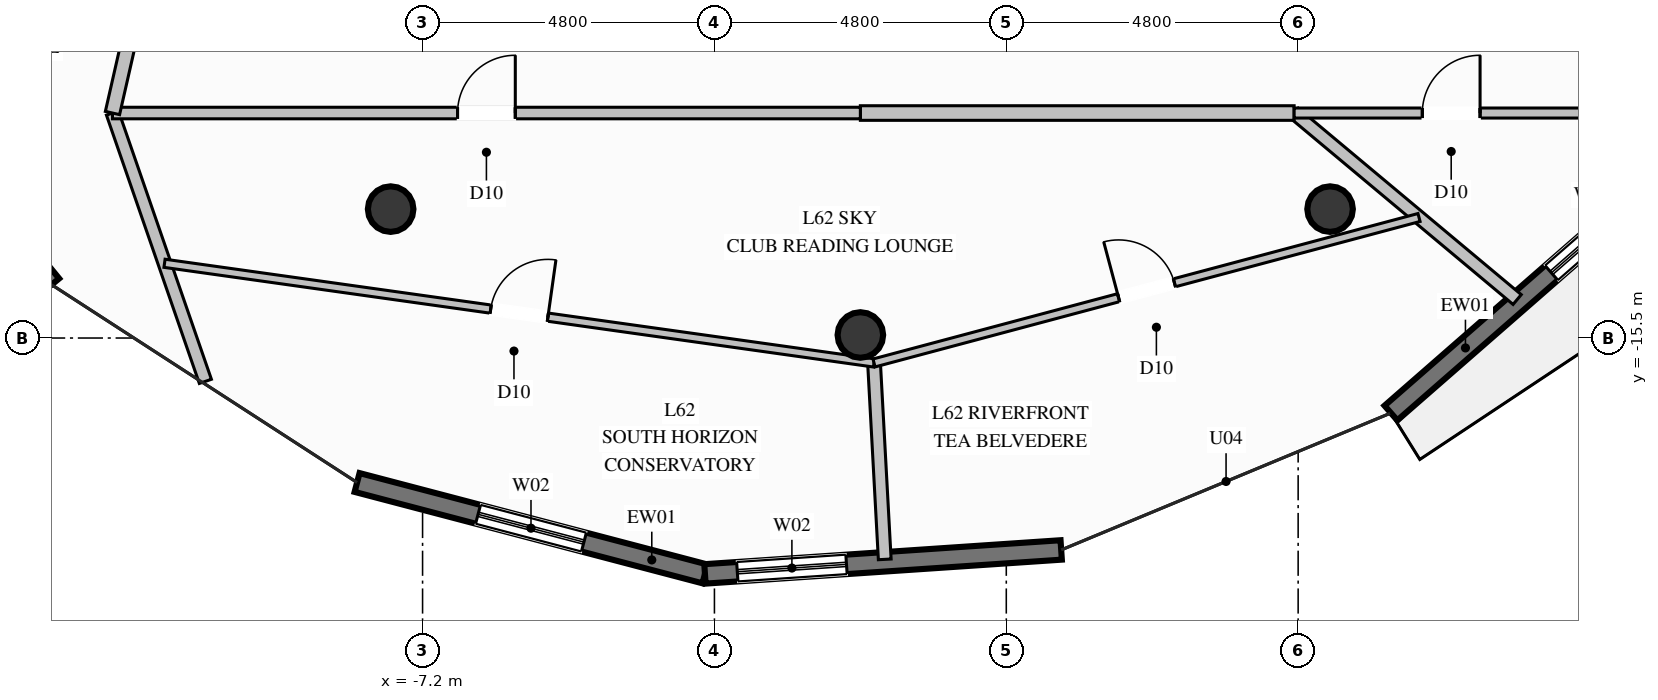
"""IFC4 building model, lengths in metres.
Left out: names, types, materials, properties, quantities, classifications, styles, units other than length and angle.
Written with IfcOpenShell. Run it as: python <this file> out.ifc"""

import sys

from ifc_helpers import new_model, si_unit, direction, frame, frame_2d, origin, origin_2d, place, context, subcontext, project, spatial, rectangle, circle, extrude, element, fill, save


model = new_model("IFC4")
c1 = context("Model", 3, precision=1e-05, world=origin(), true_north=direction((0.0, 1.0)))
c2 = subcontext(c1, "Body", "Model", "MODEL_VIEW")
j1 = project(units=[si_unit("LENGTHUNIT", "METRE"), si_unit("PLANEANGLEUNIT", "RADIAN")], contexts=[c1])
p1 = place(None, origin())
s1 = spatial("IfcSite", under=j1, at=p1, CompositionType="ELEMENT")
p2 = place(p1, origin())
s2 = spatial("IfcBuilding", under=s1, at=p2, CompositionType="ELEMENT")
p3 = place(p2, frame((0.0, 0.0, 239.2)))
s3 = spatial("IfcBuildingStorey", under=s2, at=p3, CompositionType="ELEMENT", Elevation=239.2)
for number, where, z_axis, x_axis in (
    (1, (-7.725, -13.38, 0.0), (0.0, 0.0, 1.0), (1.0, 0.0, 0.0)),
    (2, (0.0, -15.45, 0.0), (0.0, 0.0, 1.0), (1.0, 0.0, 0.0)),
    (3, (7.725, -13.38, 0.0), (0.0, 0.0, 1.0), (1.0, 0.0, 0.0)),
):
    element("IfcColumn", number, at=place(p3, frame(where, z_axis=z_axis, x_axis=x_axis)), inside=s3, PredefinedType="COLUMN", context=c2, shape_type="SweptSolid", body=[
        extrude(circle(Radius=0.375, at=origin_2d()), origin(), (0.0, 0.0, 1.0), 3.8),
    ])
p4 = place(p3, frame((13.182, -12.842, 0.0), z_axis=(0.0, 0.0, 1.0), x_axis=(-0.753243589512, -0.657741662706, 0.0)))
e4 = element("IfcWall", 4, at=p4, inside=s3, PredefinedType="SOLIDWALL", context=c2, shape_type="SweptSolid", body=[
    extrude(rectangle(XDim=5.916, YDim=0.32, at=frame_2d((2.958, 0.0))), origin(), (0.0, 0.0, 1.0), 3.57),
])
p5 = place(p4, frame((0.612, 0.0, 0.35)))
e5 = element("IfcOpeningElement", 5, at=p5, cuts=e4, PredefinedType="OPENING", context=c2, shape_type="SweptSolid", body=[
    extrude(rectangle(XDim=1.8, YDim=2.6, at=frame_2d((0.9, 1.3))), frame((0.0, 0.17, 0.0), z_axis=(0.0, -1.0, 0.0), x_axis=(1.0, 0.0, 0.0)), (0.0, 0.0, 1.0), 0.34),
])
p6 = place(p3, frame((-13.301, -14.623, 0.0), z_axis=(0.0, 0.0, 1.0), x_axis=(-0.633391522875, 0.773831492478, 0.0)))
e6 = element("IfcWall", 6, at=p6, inside=s3, PredefinedType="SOLIDWALL", context=c2, shape_type="SweptSolid", body=[
    extrude(rectangle(XDim=6.053, YDim=0.32, at=frame_2d((3.027, 0.0))), origin(), (0.0, 0.0, 1.0), 3.57),
])
p7 = place(p6, frame((2.092, 0.0, 0.35)))
e7 = element("IfcOpeningElement", 7, at=p7, cuts=e6, PredefinedType="OPENING", context=c2, shape_type="SweptSolid", body=[
    extrude(rectangle(XDim=1.8, YDim=2.6, at=frame_2d((0.9, 1.3))), frame((0.0, 0.17, 0.0), z_axis=(0.0, -1.0, 0.0), x_axis=(1.0, 0.0, 0.0)), (0.0, 0.0, 1.0), 0.34),
])
p8 = place(p3, frame((-2.556, -19.379, 0.0), z_axis=(0.0, 0.0, 1.0), x_axis=(-0.96718457854, 0.254074774494, 0.0)))
e8 = element("IfcWall", 8, at=p8, inside=s3, PredefinedType="SOLIDWALL", context=c2, shape_type="SweptSolid", body=[
    extrude(rectangle(XDim=5.915, YDim=0.32, at=frame_2d((2.958, 0.0))), origin(), (0.0, 0.0, 1.0), 3.57),
])
p9 = place(p8, frame((2.058, 0.0, 0.35)))
e9 = element("IfcOpeningElement", 9, at=p9, cuts=e8, PredefinedType="OPENING", context=c2, shape_type="SweptSolid", body=[
    extrude(rectangle(XDim=1.8, YDim=2.6, at=frame_2d((0.9, 1.3))), frame((0.0, 0.17, 0.0), z_axis=(0.0, -1.0, 0.0), x_axis=(1.0, 0.0, 0.0)), (0.0, 0.0, 1.0), 0.34),
])
p10 = place(p3, frame((3.303, -18.985, 0.0), z_axis=(0.0, 0.0, 1.0), x_axis=(-0.997748768453, -0.067062620365, 0.0)))
e10 = element("IfcWall", 10, at=p10, inside=s3, PredefinedType="SOLIDWALL", context=c2, shape_type="SweptSolid", body=[
    extrude(rectangle(XDim=5.872, YDim=0.32, at=frame_2d((2.936, 0.0))), origin(), (0.0, 0.0, 1.0), 3.57),
])
p11 = place(p10, frame((3.539, 0.0, 0.35)))
e11 = element("IfcOpeningElement", 11, at=p11, cuts=e10, PredefinedType="OPENING", context=c2, shape_type="SweptSolid", body=[
    extrude(rectangle(XDim=1.8, YDim=2.6, at=frame_2d((0.9, 1.3))), frame((0.0, 0.17, 0.0), z_axis=(0.0, -1.0, 0.0), x_axis=(1.0, 0.0, 0.0)), (0.0, 0.0, 1.0), 0.34),
])
p12 = place(p3, frame((7.134, -11.8, 0.0), z_axis=(0.0, 0.0, 1.0), x_axis=(0.767165499913, -0.641449215249, 0.0)))
e12 = element("IfcWall", 12, at=p12, inside=s3, PredefinedType="PARTITIONING", context=c2, shape_type="SweptSolid", body=[
    extrude(rectangle(XDim=4.781, YDim=0.21, at=frame_2d((2.391, 0.0))), origin(), (0.0, 0.0, 1.0), 3.57),
])
p13 = place(p3, frame((-12.3, -11.8, 0.0), z_axis=(0.0, 0.0, 1.0), x_axis=(0.327216501768, -0.944949395984, 0.0)))
e13 = element("IfcWall", 13, at=p13, inside=s3, PredefinedType="PARTITIONING", context=c2, shape_type="SweptSolid", body=[
    extrude(rectangle(XDim=4.67, YDim=0.21, at=frame_2d((2.335, 0.0))), origin(), (0.0, 0.0, 1.0), 3.57),
])
p14 = place(p3, frame((0.0, -11.8, 0.0), z_axis=(0.0, 0.0, 1.0), x_axis=(1.0, 0.0, 0.0)))
e14 = element("IfcWall", 14, at=p14, inside=s3, PredefinedType="PARTITIONING", context=c2, shape_type="SweptSolid", body=[
    extrude(rectangle(XDim=7.134, YDim=0.24, at=frame_2d((3.567, 0.0))), origin(), (0.0, 0.0, 1.0), 3.57),
])
p15 = place(p3, frame((-12.3, -11.8, 0.0), z_axis=(0.0, 0.0, 1.0), x_axis=(1.0, 0.0, 0.0)))
e15 = element("IfcWall", 15, at=p15, inside=s3, PredefinedType="PARTITIONING", context=c2, shape_type="SweptSolid", body=[
    extrude(rectangle(XDim=12.3, YDim=0.19, at=frame_2d((6.15, 0.0))), origin(), (0.0, 0.0, 1.0), 3.57),
])
p16 = place(p15, frame((5.675, 0.0, 0.0)))
e16 = element("IfcOpeningElement", 16, at=p16, cuts=e15, PredefinedType="OPENING", context=c2, shape_type="SweptSolid", body=[
    extrude(rectangle(XDim=0.95, YDim=2.1, at=frame_2d((0.475, 1.05))), frame((0.0, 0.105, 0.0), z_axis=(0.0, -1.0, 0.0), x_axis=(1.0, 0.0, 0.0)), (0.0, 0.0, 1.0), 0.21),
])
p17 = place(p3, frame((-11.042, -6.275, 0.0), z_axis=(0.0, 0.0, 1.0), x_axis=(-0.222014008723, -0.975043475918, 0.0)))
e17 = element("IfcWall", 17, at=p17, inside=s3, PredefinedType="PARTITIONING", context=c2, shape_type="SweptSolid", body=[
    extrude(rectangle(XDim=5.667, YDim=0.24, at=frame_2d((2.833, 0.0))), origin(), (0.0, 0.0, 1.0), 3.57),
])
p18 = place(p17, frame((2.333, 0.0, 0.0)))
e18 = element("IfcOpeningElement", 18, at=p18, cuts=e17, PredefinedType="OPENING", context=c2, shape_type="SweptSolid", body=[
    extrude(rectangle(XDim=1.0, YDim=2.2, at=frame_2d((0.5, 1.1))), frame((0.0, 0.13, 0.0), z_axis=(0.0, -1.0, 0.0), x_axis=(1.0, 0.0, 0.0)), (0.0, 0.0, 1.0), 0.26),
])
p19 = place(p3, frame((0.225, -15.91, 0.0), z_axis=(0.0, 0.0, 1.0), x_axis=(0.054341356021, -0.998522416887, 0.0)))
e19 = element("IfcWall", 19, at=p19, inside=s3, PredefinedType="PARTITIONING", context=c2, shape_type="SweptSolid", body=[
    extrude(rectangle(XDim=3.235, YDim=0.21, at=frame_2d((1.617, 0.0))), origin(), (0.0, 0.0, 1.0), 3.57),
])
p20 = place(p3, frame((-11.444, -14.271, 0.0), z_axis=(0.0, 0.0, 1.0), x_axis=(0.990280714827, -0.139083089705, 0.0)))
e20 = element("IfcWall", 20, at=p20, inside=s3, PredefinedType="PARTITIONING", context=c2, shape_type="SweptSolid", body=[
    extrude(rectangle(XDim=11.784, YDim=0.135, at=frame_2d((5.892, 0.0))), origin(), (0.0, 0.0, 1.0), 3.139),
])
p21 = place(p20, frame((5.417, 0.0, 0.0)))
e21 = element("IfcOpeningElement", 21, at=p21, cuts=e20, PredefinedType="OPENING", context=c2, shape_type="SweptSolid", body=[
    extrude(rectangle(XDim=0.95, YDim=2.1, at=frame_2d((0.475, 1.05))), frame((0.0, 0.078, 0.0), z_axis=(0.0, -1.0, 0.0), x_axis=(1.0, 0.0, 0.0)), (0.0, 0.0, 1.0), 0.155),
])
p22 = place(p3, frame((0.225, -15.91, 0.0), z_axis=(0.0, 0.0, 1.0), x_axis=(0.966188184598, 0.25783791797, 0.0)))
e22 = element("IfcWall", 22, at=p22, inside=s3, PredefinedType="PARTITIONING", context=c2, shape_type="SweptSolid", body=[
    extrude(rectangle(XDim=9.277, YDim=0.135, at=frame_2d((4.638, 0.0))), origin(), (0.0, 0.0, 1.0), 3.139),
])
p23 = place(p22, frame((4.163, 0.0, 0.0)))
e23 = element("IfcOpeningElement", 23, at=p23, cuts=e22, PredefinedType="OPENING", context=c2, shape_type="SweptSolid", body=[
    extrude(rectangle(XDim=0.95, YDim=2.1, at=frame_2d((0.475, 1.05))), frame((0.0, 0.078, 0.0), z_axis=(0.0, -1.0, 0.0), x_axis=(1.0, 0.0, 0.0)), (0.0, 0.0, 1.0), 0.155),
])
p24 = place(p3, frame((12.3, -11.8, 0.0), z_axis=(0.0, 0.0, 1.0), x_axis=(-0.222014008723, 0.975043475918, 0.0)))
e24 = element("IfcWall", 24, at=p24, inside=s3, PredefinedType="PARTITIONING", context=c2, shape_type="SweptSolid", body=[
    extrude(rectangle(XDim=5.667, YDim=0.24, at=frame_2d((2.833, 0.0))), origin(), (0.0, 0.0, 1.0), 3.57),
])
p25 = place(p3, frame((7.134, -11.8, 0.0), z_axis=(0.0, 0.0, 1.0), x_axis=(1.0, 0.0, 0.0)))
e25 = element("IfcWall", 25, at=p25, inside=s3, PredefinedType="PARTITIONING", context=c2, shape_type="SweptSolid", body=[
    extrude(rectangle(XDim=5.166, YDim=0.165, at=frame_2d((2.583, 0.0))), origin(), (0.0, 0.0, 1.0), 3.57),
])
p26 = place(p25, frame((2.108, 0.0, 0.0)))
e26 = element("IfcOpeningElement", 26, at=p26, cuts=e25, PredefinedType="OPENING", context=c2, shape_type="SweptSolid", body=[
    extrude(rectangle(XDim=0.95, YDim=2.1, at=frame_2d((0.475, 1.05))), frame((0.0, 0.093, 0.0), z_axis=(0.0, -1.0, 0.0), x_axis=(1.0, 0.0, 0.0)), (0.0, 0.0, 1.0), 0.185),
])
p27 = place(p5, origin())
e27 = element("IfcWindow", 27, at=p27, inside=s3, PartitioningType="SINGLE_PANEL", PredefinedType="WINDOW", context=c2, shape_type="SweptSolid", body=[
    extrude(rectangle(XDim=1.8, YDim=2.6, at=frame_2d((0.9, 1.3))), frame((0.0, 0.03, 0.0), z_axis=(0.0, -1.0, 0.0), x_axis=(1.0, 0.0, 0.0)), (0.0, 0.0, 1.0), 0.06),
])
fill(e5, e27)
p28 = place(p9, origin())
e28 = element("IfcWindow", 28, at=p28, inside=s3, PartitioningType="SINGLE_PANEL", PredefinedType="WINDOW", context=c2, shape_type="SweptSolid", body=[
    extrude(rectangle(XDim=1.8, YDim=2.6, at=frame_2d((0.9, 1.3))), frame((0.0, 0.03, 0.0), z_axis=(0.0, -1.0, 0.0), x_axis=(1.0, 0.0, 0.0)), (0.0, 0.0, 1.0), 0.06),
])
fill(e9, e28)
p29 = place(p11, origin())
e29 = element("IfcWindow", 29, at=p29, inside=s3, PartitioningType="SINGLE_PANEL", PredefinedType="WINDOW", context=c2, shape_type="SweptSolid", body=[
    extrude(rectangle(XDim=1.8, YDim=2.6, at=frame_2d((0.9, 1.3))), frame((0.0, 0.03, 0.0), z_axis=(0.0, -1.0, 0.0), x_axis=(1.0, 0.0, 0.0)), (0.0, 0.0, 1.0), 0.06),
])
fill(e11, e29)
p30 = place(p16, origin())
e30 = element("IfcDoor", 30, at=p30, inside=s3, OperationType="SINGLE_SWING_RIGHT", PredefinedType="DOOR", context=c2, shape_type="SweptSolid", body=[
    extrude(rectangle(XDim=0.95, YDim=2.1, at=frame_2d((0.475, 1.05))), frame((0.0, 0.025, 0.0), z_axis=(0.0, -1.0, 0.0), x_axis=(1.0, 0.0, 0.0)), (0.0, 0.0, 1.0), 0.05),
])
fill(e16, e30)
p31 = place(p21, origin())
e31 = element("IfcDoor", 31, at=p31, inside=s3, OperationType="SINGLE_SWING_RIGHT", PredefinedType="DOOR", context=c2, shape_type="SweptSolid", body=[
    extrude(rectangle(XDim=0.95, YDim=2.1, at=frame_2d((0.475, 1.05))), frame((0.0, 0.025, 0.0), z_axis=(0.0, -1.0, 0.0), x_axis=(1.0, 0.0, 0.0)), (0.0, 0.0, 1.0), 0.05),
])
fill(e21, e31)
p32 = place(p23, origin())
e32 = element("IfcDoor", 32, at=p32, inside=s3, OperationType="SINGLE_SWING_LEFT", PredefinedType="DOOR", context=c2, shape_type="SweptSolid", body=[
    extrude(rectangle(XDim=0.95, YDim=2.1, at=frame_2d((0.475, 1.05))), frame((0.0, 0.025, 0.0), z_axis=(0.0, -1.0, 0.0), x_axis=(1.0, 0.0, 0.0)), (0.0, 0.0, 1.0), 0.05),
])
fill(e23, e32)
p33 = place(p26, origin())
e33 = element("IfcDoor", 33, at=p33, inside=s3, OperationType="SINGLE_SWING_RIGHT", PredefinedType="DOOR", context=c2, shape_type="SweptSolid", body=[
    extrude(rectangle(XDim=0.95, YDim=2.1, at=frame_2d((0.475, 1.05))), frame((0.0, 0.025, 0.0), z_axis=(0.0, -1.0, 0.0), x_axis=(1.0, 0.0, 0.0)), (0.0, 0.0, 1.0), 0.05),
])
fill(e26, e33)
save(model, sys.argv[1])
